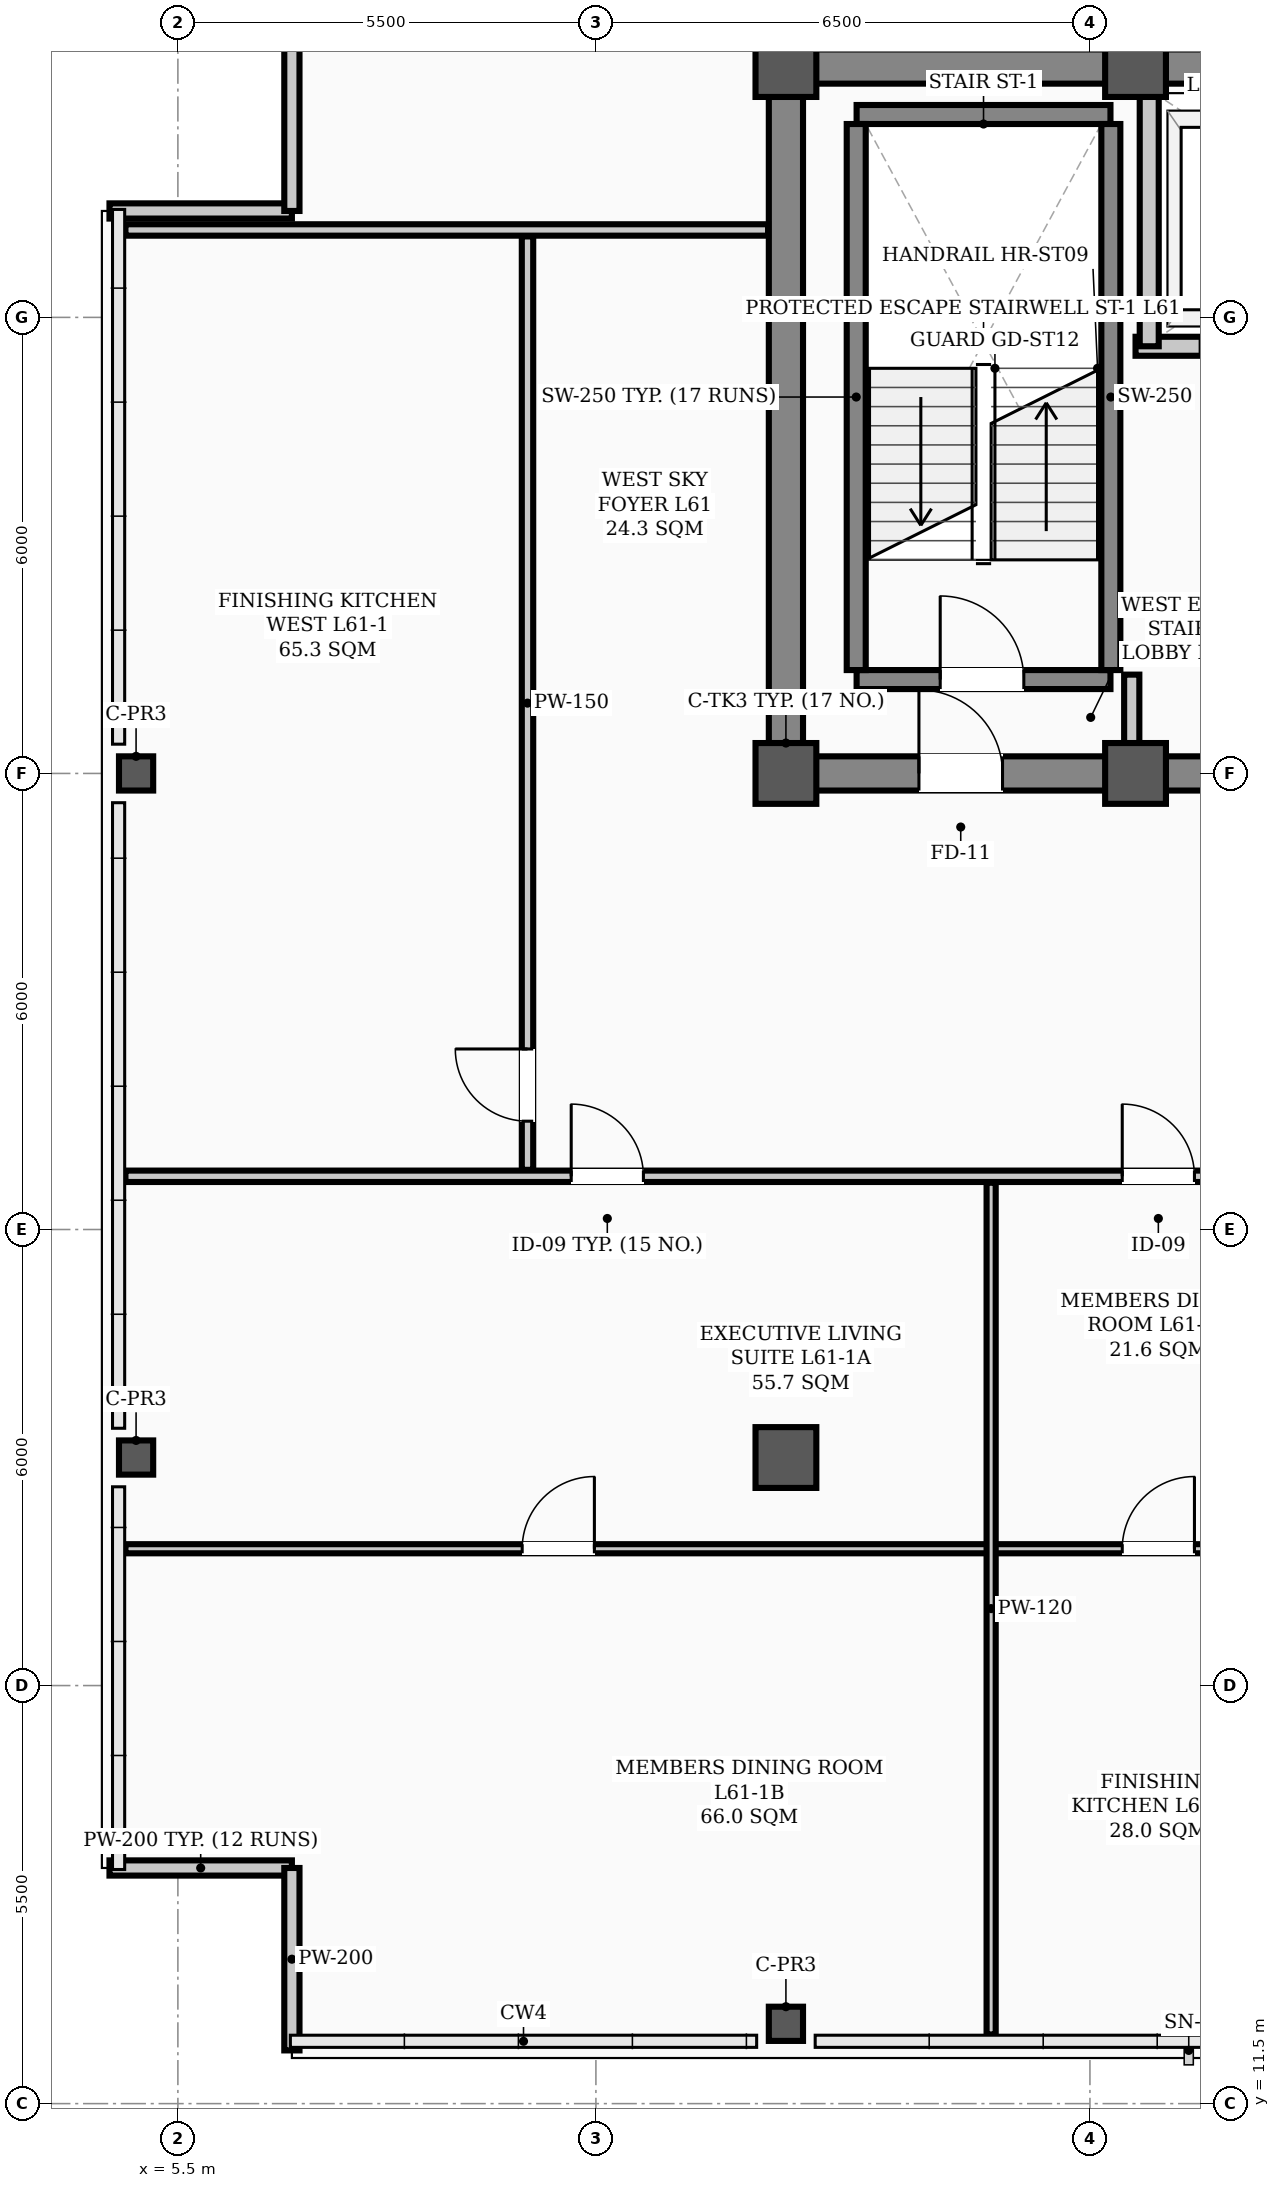
"""IFC4 building model, lengths in metres.
Left out: names, types, materials, properties, quantities, classifications, styles, units other than length and angle.
Written with IfcOpenShell. Run it as: python <this file> out.ifc"""

import sys

from ifc_helpers import new_model, si_unit, direction, frame, frame_2d, origin, origin_2d, place, context, subcontext, project, spatial, rectangle, hollow_rectangle, extrude, element, fill, save


model = new_model("IFC4")
c1 = context("Model", 3, precision=1e-05, world=origin(), true_north=direction((0.0, 1.0)))
c2 = subcontext(c1, "Body", "Model", "MODEL_VIEW")
j1 = project(units=[si_unit("LENGTHUNIT", "METRE"), si_unit("PLANEANGLEUNIT", "RADIAN")], contexts=[c1])
p1 = place(None, origin())
s1 = spatial("IfcSite", under=j1, at=p1, CompositionType="ELEMENT")
p2 = place(p1, origin())
s2 = spatial("IfcBuilding", under=s1, at=p2, CompositionType="ELEMENT")
p3 = place(p2, frame((0.0, 0.0, 246.2)))
s3 = spatial("IfcBuildingStorey", under=s2, at=p3, CompositionType="ELEMENT", Elevation=246.2)
for number, where, z_axis, x_axis in (
    (1, (13.5, 29.0, 0.0), (0.0, 0.0, 1.0), (1.0, 0.0, 0.0)),
    (2, (13.5, 38.3, 0.0), (0.0, 0.0, 1.0), (1.0, 0.0, 0.0)),
    (3, (18.1, 29.0, 0.0), (0.0, 0.0, 1.0), (1.0, 0.0, 0.0)),
    (4, (18.1, 38.3, 0.0), (0.0, 0.0, 1.0), (1.0, 0.0, 0.0)),
    (5, (13.5, 20.0, 0.0), (0.0, 0.0, 1.0), (1.0, 0.0, 0.0)),
):
    element("IfcColumn", number, at=place(p3, frame(where, z_axis=z_axis, x_axis=x_axis)), inside=s3, PredefinedType="COLUMN", context=c2, shape_type="SweptSolid", body=[
        extrude(hollow_rectangle(XDim=0.8, YDim=0.8, WallThickness=0.032, InnerFilletRadius=0.016, OuterFilletRadius=0.048, at=origin_2d()), origin(), (0.0, 0.0, 1.0), 3.9),
    ])
for number, where, z_axis, x_axis in (
    (6, (4.95, 20.0, 0.0), (0.0, 0.0, 1.0), (1.0, 0.0, 0.0)),
    (7, (4.95, 29.0, 0.0), (0.0, 0.0, 1.0), (1.0, 0.0, 0.0)),
    (8, (13.5, 12.55, 0.0), (0.0, 0.0, 1.0), (1.0, 0.0, 0.0)),
):
    element("IfcColumn", number, at=place(p3, frame(where, z_axis=z_axis, x_axis=x_axis)), inside=s3, PredefinedType="COLUMN", context=c2, shape_type="SweptSolid", body=[
        extrude(hollow_rectangle(XDim=0.45, YDim=0.45, WallThickness=0.022, InnerFilletRadius=0.022, OuterFilletRadius=0.044, at=origin_2d()), origin(), (0.0, 0.0, 1.0), 3.9),
    ])
p4 = place(p3, frame((4.6, 14.6, 0.0), z_axis=(0.0, 0.0, 1.0), x_axis=(1.0, 0.0, 0.0)))
e9 = element("IfcWall", 9, at=p4, inside=s3, PredefinedType="PARAPET", context=c2, shape_type="SweptSolid", body=[
    extrude(rectangle(XDim=2.4, YDim=0.2, at=frame_2d((1.2, 0.0))), origin(), (0.0, 0.0, 1.0), 1.2),
])
p5 = place(p3, frame((7.0, 14.6, 0.0), z_axis=(0.0, 0.0, 1.0), x_axis=(0.0, -1.0, 0.0)))
e10 = element("IfcWall", 10, at=p5, inside=s3, PredefinedType="PARAPET", context=c2, shape_type="SweptSolid", body=[
    extrude(rectangle(XDim=2.4, YDim=0.2, at=frame_2d((1.2, 0.0))), origin(), (0.0, 0.0, 1.0), 1.2),
])
p6 = place(p3, frame((4.6, 36.4, 0.0), z_axis=(0.0, 0.0, 1.0), x_axis=(1.0, 0.0, 0.0)))
e11 = element("IfcWall", 11, at=p6, inside=s3, PredefinedType="PARAPET", context=c2, shape_type="SweptSolid", body=[
    extrude(rectangle(XDim=2.4, YDim=0.2, at=frame_2d((1.2, 0.0))), origin(), (0.0, 0.0, 1.0), 1.2),
])
p7 = place(p3, frame((7.0, 36.4, 0.0), z_axis=(0.0, 0.0, 1.0), x_axis=(0.0, 1.0, 0.0)))
e12 = element("IfcWall", 12, at=p7, inside=s3, PredefinedType="PARAPET", context=c2, shape_type="SweptSolid", body=[
    extrude(rectangle(XDim=2.4, YDim=0.2, at=frame_2d((1.2, 0.0))), origin(), (0.0, 0.0, 1.0), 1.2),
])
p8 = place(p3, frame((13.5, 29.0, 0.0), z_axis=(0.0, 0.0, 1.0), x_axis=(1.0, 0.0, 0.0)))
e13 = element("IfcWall", 13, at=p8, inside=s3, PredefinedType="SHEAR", context=c2, shape_type="SweptSolid", body=[
    extrude(rectangle(XDim=30.5, YDim=0.45, at=frame_2d((15.25, 0.0))), origin(), (0.0, 0.0, 1.0), 3.72),
])
p9 = place(p8, frame((1.75, 0.0, 0.0)))
e14 = element("IfcOpeningElement", 14, at=p9, cuts=e13, PredefinedType="OPENING", context=c2, shape_type="SweptSolid", body=[
    extrude(rectangle(XDim=1.1, YDim=2.08, at=frame_2d((0.55, 1.04))), frame((0.0, 0.235, 0.0), z_axis=(0.0, -1.0, 0.0), x_axis=(1.0, 0.0, 0.0)), (0.0, 0.0, 1.0), 0.47),
])
p10 = place(p8, frame((26.7, 0.0, 0.0)))
e15 = element("IfcOpeningElement", 15, at=p10, cuts=e13, PredefinedType="OPENING", context=c2, shape_type="SweptSolid", body=[
    extrude(rectangle(XDim=1.1, YDim=2.08, at=frame_2d((0.55, 1.04))), frame((0.0, 0.235, 0.0), z_axis=(0.0, -1.0, 0.0), x_axis=(1.0, 0.0, 0.0)), (0.0, 0.0, 1.0), 0.47),
])
p11 = place(p8, frame((6.8, 0.0, 0.0)))
e16 = element("IfcOpeningElement", 16, at=p11, cuts=e13, PredefinedType="OPENING", context=c2, shape_type="SweptSolid", body=[
    extrude(rectangle(XDim=1.1, YDim=2.08, at=frame_2d((0.55, 1.04))), frame((0.0, 0.235, 0.0), z_axis=(0.0, -1.0, 0.0), x_axis=(1.0, 0.0, 0.0)), (0.0, 0.0, 1.0), 0.47),
])
p12 = place(p8, frame((13.2, 0.0, 0.0)))
e17 = element("IfcOpeningElement", 17, at=p12, cuts=e13, PredefinedType="OPENING", context=c2, shape_type="SweptSolid", body=[
    extrude(rectangle(XDim=1.6, YDim=2.08, at=frame_2d((0.8, 1.04))), frame((0.0, 0.235, 0.0), z_axis=(0.0, -1.0, 0.0), x_axis=(1.0, 0.0, 0.0)), (0.0, 0.0, 1.0), 0.47),
])
p13 = place(p8, frame((19.5, 0.0, 0.0)))
e18 = element("IfcOpeningElement", 18, at=p13, cuts=e13, PredefinedType="OPENING", context=c2, shape_type="SweptSolid", body=[
    extrude(rectangle(XDim=0.9, YDim=2.08, at=frame_2d((0.45, 1.04))), frame((0.0, 0.235, 0.0), z_axis=(0.0, -1.0, 0.0), x_axis=(1.0, 0.0, 0.0)), (0.0, 0.0, 1.0), 0.47),
])
p14 = place(p8, frame((21.55, 0.0, 0.0)))
e19 = element("IfcOpeningElement", 19, at=p14, cuts=e13, PredefinedType="OPENING", context=c2, shape_type="SweptSolid", body=[
    extrude(rectangle(XDim=0.9, YDim=2.08, at=frame_2d((0.45, 1.04))), frame((0.0, 0.235, 0.0), z_axis=(0.0, -1.0, 0.0), x_axis=(1.0, 0.0, 0.0)), (0.0, 0.0, 1.0), 0.47),
])
p15 = place(p3, frame((13.5, 38.3, 0.0), z_axis=(0.0, 0.0, 1.0), x_axis=(1.0, 0.0, 0.0)))
e20 = element("IfcWall", 20, at=p15, inside=s3, PredefinedType="SHEAR", context=c2, shape_type="SweptSolid", body=[
    extrude(rectangle(XDim=30.5, YDim=0.45, at=frame_2d((15.25, 0.0))), origin(), (0.0, 0.0, 1.0), 3.72),
])
p16 = place(p3, frame((13.5, 29.35, 0.0), z_axis=(0.0, 0.0, 1.0), x_axis=(0.0, 1.0, 0.0)))
e21 = element("IfcWall", 21, at=p16, inside=s3, PredefinedType="SHEAR", context=c2, shape_type="SweptSolid", body=[
    extrude(rectangle(XDim=8.6, YDim=0.45, at=frame_2d((4.3, 0.0))), origin(), (0.0, 0.0, 1.0), 3.72),
])
p17 = place(p3, frame((14.43, 30.235, 0.0), z_axis=(0.0, 0.0, 1.0), x_axis=(1.0, 0.0, 0.0)))
e22 = element("IfcWall", 22, at=p17, inside=s3, PredefinedType="STANDARD", context=c2, shape_type="SweptSolid", body=[
    extrude(rectangle(XDim=3.34, YDim=0.25, at=frame_2d((1.67, 0.0))), origin(), (0.0, 0.0, 1.0), 3.72),
])
p18 = place(p17, frame((1.1, 0.0, 0.0)))
e23 = element("IfcOpeningElement", 23, at=p18, cuts=e22, PredefinedType="OPENING", context=c2, shape_type="SweptSolid", body=[
    extrude(rectangle(XDim=1.1, YDim=2.08, at=frame_2d((0.55, 1.04))), frame((0.0, 0.135, 0.0), z_axis=(0.0, -1.0, 0.0), x_axis=(1.0, 0.0, 0.0)), (0.0, 0.0, 1.0), 0.27),
])
p19 = place(p3, frame((14.43, 37.669, 0.0), z_axis=(0.0, 0.0, 1.0), x_axis=(1.0, 0.0, 0.0)))
e24 = element("IfcWall", 24, at=p19, inside=s3, PredefinedType="STANDARD", context=c2, shape_type="SweptSolid", body=[
    extrude(rectangle(XDim=3.34, YDim=0.25, at=frame_2d((1.67, 0.0))), origin(), (0.0, 0.0, 1.0), 3.72),
])
for number, where, z_axis, x_axis in (
    (25, (14.425, 30.36, 0.0), (0.0, 0.0, 1.0), (0.0, 1.0, 0.0)),
    (26, (17.775, 30.36, 0.0), (0.0, 0.0, 1.0), (0.0, 1.0, 0.0)),
):
    element("IfcWall", number, at=place(p3, frame(where, z_axis=z_axis, x_axis=x_axis)), inside=s3, PredefinedType="STANDARD", context=c2, shape_type="SweptSolid", body=[
        extrude(rectangle(XDim=7.184, YDim=0.25, at=frame_2d((3.592, 0.0))), origin(), (0.0, 0.0, 1.0), 3.72),
    ])
p20 = place(p3, frame((18.1, 34.62, 0.0), z_axis=(0.0, 0.0, 1.0), x_axis=(1.0, 0.0, 0.0)))
e27 = element("IfcWall", 27, at=p20, inside=s3, PredefinedType="STANDARD", context=c2, shape_type="SweptSolid", body=[
    extrude(rectangle(XDim=5.35, YDim=0.25, at=frame_2d((2.675, 0.0))), origin(), (0.0, 0.0, 1.0), 3.72),
])
p21 = place(p20, frame((0.85, 0.0, 0.0)))
e28 = element("IfcOpeningElement", 28, at=p21, cuts=e27, PredefinedType="OPENING", context=c2, shape_type="SweptSolid", body=[
    extrude(rectangle(XDim=1.1, YDim=2.08, at=frame_2d((0.55, 1.04))), frame((0.0, 0.135, 0.0), z_axis=(0.0, -1.0, 0.0), x_axis=(1.0, 0.0, 0.0)), (0.0, 0.0, 1.0), 0.27),
])
p22 = place(p20, frame((3.45, 0.0, 0.0)))
e29 = element("IfcOpeningElement", 29, at=p22, cuts=e27, PredefinedType="OPENING", context=c2, shape_type="SweptSolid", body=[
    extrude(rectangle(XDim=1.1, YDim=2.08, at=frame_2d((0.55, 1.04))), frame((0.0, 0.135, 0.0), z_axis=(0.0, -1.0, 0.0), x_axis=(1.0, 0.0, 0.0)), (0.0, 0.0, 1.0), 0.27),
])
p23 = place(p3, frame((18.28, 34.62, 0.0), z_axis=(0.0, 0.0, 1.0), x_axis=(0.0, 1.0, 0.0)))
e30 = element("IfcWall", 30, at=p23, inside=s3, PredefinedType="STANDARD", context=c2, shape_type="SweptSolid", body=[
    extrude(rectangle(XDim=3.33, YDim=0.25, at=frame_2d((1.665, 0.0))), origin(), (0.0, 0.0, 1.0), 3.72),
])
p24 = place(p3, frame((4.81, 23.7, 0.0), z_axis=(0.0, 0.0, 1.0), x_axis=(1.0, 0.0, 0.0)))
e31 = element("IfcWall", 31, at=p24, inside=s3, PredefinedType="PARTITIONING", context=c2, shape_type="SweptSolid", body=[
    extrude(rectangle(XDim=40.88, YDim=0.15, at=frame_2d((20.44, 0.0))), origin(), (0.0, 0.0, 1.0), 3.2),
])
p25 = place(p24, frame((5.865, 0.0, 0.0)))
e32 = element("IfcOpeningElement", 32, at=p25, cuts=e31, PredefinedType="OPENING", context=c2, shape_type="SweptSolid", body=[
    extrude(rectangle(XDim=0.95, YDim=2.08, at=frame_2d((0.475, 1.04))), frame((0.0, 0.085, 0.0), z_axis=(0.0, -1.0, 0.0), x_axis=(1.0, 0.0, 0.0)), (0.0, 0.0, 1.0), 0.17),
])
p26 = place(p24, frame((13.115, 0.0, 0.0)))
e33 = element("IfcOpeningElement", 33, at=p26, cuts=e31, PredefinedType="OPENING", context=c2, shape_type="SweptSolid", body=[
    extrude(rectangle(XDim=0.95, YDim=2.08, at=frame_2d((0.475, 1.04))), frame((0.0, 0.085, 0.0), z_axis=(0.0, -1.0, 0.0), x_axis=(1.0, 0.0, 0.0)), (0.0, 0.0, 1.0), 0.17),
])
p27 = place(p24, frame((16.515, 0.0, 0.0)))
e34 = element("IfcOpeningElement", 34, at=p27, cuts=e31, PredefinedType="OPENING", context=c2, shape_type="SweptSolid", body=[
    extrude(rectangle(XDim=0.95, YDim=2.08, at=frame_2d((0.475, 1.04))), frame((0.0, 0.085, 0.0), z_axis=(0.0, -1.0, 0.0), x_axis=(1.0, 0.0, 0.0)), (0.0, 0.0, 1.0), 0.17),
])
p28 = place(p24, frame((22.915, 0.0, 0.0)))
e35 = element("IfcOpeningElement", 35, at=p28, cuts=e31, PredefinedType="OPENING", context=c2, shape_type="SweptSolid", body=[
    extrude(rectangle(XDim=0.95, YDim=2.08, at=frame_2d((0.475, 1.04))), frame((0.0, 0.085, 0.0), z_axis=(0.0, -1.0, 0.0), x_axis=(1.0, 0.0, 0.0)), (0.0, 0.0, 1.0), 0.17),
])
p29 = place(p24, frame((29.115, 0.0, 0.0)))
e36 = element("IfcOpeningElement", 36, at=p29, cuts=e31, PredefinedType="OPENING", context=c2, shape_type="SweptSolid", body=[
    extrude(rectangle(XDim=0.95, YDim=2.08, at=frame_2d((0.475, 1.04))), frame((0.0, 0.085, 0.0), z_axis=(0.0, -1.0, 0.0), x_axis=(1.0, 0.0, 0.0)), (0.0, 0.0, 1.0), 0.17),
])
p30 = place(p24, frame((34.215, 0.0, 0.0)))
e37 = element("IfcOpeningElement", 37, at=p30, cuts=e31, PredefinedType="OPENING", context=c2, shape_type="SweptSolid", body=[
    extrude(rectangle(XDim=0.95, YDim=2.08, at=frame_2d((0.475, 1.04))), frame((0.0, 0.085, 0.0), z_axis=(0.0, -1.0, 0.0), x_axis=(1.0, 0.0, 0.0)), (0.0, 0.0, 1.0), 0.17),
])
p31 = place(p24, frame((38.46, 0.0, 0.0)))
e38 = element("IfcOpeningElement", 38, at=p31, cuts=e31, PredefinedType="OPENING", context=c2, shape_type="SweptSolid", body=[
    extrude(rectangle(XDim=0.95, YDim=2.08, at=frame_2d((0.475, 1.04))), frame((0.0, 0.085, 0.0), z_axis=(0.0, -1.0, 0.0), x_axis=(1.0, 0.0, 0.0)), (0.0, 0.0, 1.0), 0.17),
])
p32 = place(p3, frame((4.81, 36.15, 0.0), z_axis=(0.0, 0.0, 1.0), x_axis=(1.0, 0.0, 0.0)))
e39 = element("IfcWall", 39, at=p32, inside=s3, PredefinedType="PARTITIONING", context=c2, shape_type="SweptSolid", body=[
    extrude(rectangle(XDim=8.455, YDim=0.15, at=frame_2d((4.228, 0.0))), origin(), (0.0, 0.0, 1.0), 3.2),
])
p33 = place(p3, frame((4.81, 18.8, 0.0), z_axis=(0.0, 0.0, 1.0), x_axis=(1.0, 0.0, 0.0)))
e40 = element("IfcWall", 40, at=p33, inside=s3, PredefinedType="PARTITIONING", context=c2, shape_type="SweptSolid", body=[
    extrude(rectangle(XDim=11.39, YDim=0.12, at=frame_2d((5.695, 0.0))), origin(), (0.0, 0.0, 1.0), 3.2),
])
p34 = place(p33, frame((5.22, 0.0, 0.0)))
e41 = element("IfcOpeningElement", 41, at=p34, cuts=e40, PredefinedType="OPENING", context=c2, shape_type="SweptSolid", body=[
    extrude(rectangle(XDim=0.95, YDim=2.08, at=frame_2d((0.475, 1.04))), frame((0.0, 0.07, 0.0), z_axis=(0.0, -1.0, 0.0), x_axis=(1.0, 0.0, 0.0)), (0.0, 0.0, 1.0), 0.14),
])
p35 = place(p3, frame((16.2, 18.8, 0.0), z_axis=(0.0, 0.0, 1.0), x_axis=(1.0, 0.0, 0.0)))
e42 = element("IfcWall", 42, at=p35, inside=s3, PredefinedType="PARTITIONING", context=c2, shape_type="SweptSolid", body=[
    extrude(rectangle(XDim=4.4, YDim=0.12, at=frame_2d((2.2, 0.0))), origin(), (0.0, 0.0, 1.0), 3.35),
])
p36 = place(p35, frame((1.725, 0.0, 0.0)))
e43 = element("IfcOpeningElement", 43, at=p36, cuts=e42, PredefinedType="OPENING", context=c2, shape_type="SweptSolid", body=[
    extrude(rectangle(XDim=0.95, YDim=2.08, at=frame_2d((0.475, 1.04))), frame((0.0, 0.07, 0.0), z_axis=(0.0, -1.0, 0.0), x_axis=(1.0, 0.0, 0.0)), (0.0, 0.0, 1.0), 0.14),
])
p37 = place(p3, frame((18.05, 29.235, 0.0), z_axis=(0.0, 0.0, 1.0), x_axis=(0.0, 1.0, 0.0)))
e44 = element("IfcWall", 44, at=p37, inside=s3, PredefinedType="STANDARD", context=c2, shape_type="SweptSolid", body=[
    extrude(rectangle(XDim=1.065, YDim=0.2, at=frame_2d((0.532, 0.0))), origin(), (0.0, 0.0, 1.0), 3.35),
])
p38 = place(p3, frame((10.1, 23.785, 0.0), z_axis=(0.0, 0.0, 1.0), x_axis=(0.0, 1.0, 0.0)))
e45 = element("IfcWall", 45, at=p38, inside=s3, PredefinedType="PARTITIONING", context=c2, shape_type="SweptSolid", body=[
    extrude(rectangle(XDim=12.28, YDim=0.15, at=frame_2d((6.14, 0.0))), origin(), (0.0, 0.0, 1.0), 3.1),
])
p39 = place(p38, frame((0.64, 0.0, 0.0)))
e46 = element("IfcOpeningElement", 46, at=p39, cuts=e45, PredefinedType="OPENING", context=c2, shape_type="SweptSolid", body=[
    extrude(rectangle(XDim=0.95, YDim=2.08, at=frame_2d((0.475, 1.04))), frame((0.0, 0.085, 0.0), z_axis=(0.0, -1.0, 0.0), x_axis=(1.0, 0.0, 0.0)), (0.0, 0.0, 1.0), 0.17),
])
p40 = place(p3, frame((16.2, 12.41, 0.0), z_axis=(0.0, 0.0, 1.0), x_axis=(0.0, 1.0, 0.0)))
e47 = element("IfcWall", 47, at=p40, inside=s3, PredefinedType="PARTITIONING", context=c2, shape_type="SweptSolid", body=[
    extrude(rectangle(XDim=11.205, YDim=0.12, at=frame_2d((5.603, 0.0))), origin(), (0.0, 0.0, 1.0), 3.1),
])
p41 = place(p18, origin())
e48 = element("IfcDoor", 48, at=p41, inside=s3, OperationType="SINGLE_SWING_LEFT", PredefinedType="DOOR", context=c2, shape_type="SweptSolid", body=[
    extrude(rectangle(XDim=1.1, YDim=2.08, at=frame_2d((0.55, 1.04))), frame((0.0, 0.025, 0.0), z_axis=(0.0, -1.0, 0.0), x_axis=(1.0, 0.0, 0.0)), (0.0, 0.0, 1.0), 0.05),
])
fill(e23, e48)
p42 = place(p9, origin())
e49 = element("IfcDoor", 49, at=p42, inside=s3, OperationType="SINGLE_SWING_LEFT", PredefinedType="DOOR", context=c2, shape_type="SweptSolid", body=[
    extrude(rectangle(XDim=1.1, YDim=2.08, at=frame_2d((0.55, 1.04))), frame((0.0, 0.025, 0.0), z_axis=(0.0, -1.0, 0.0), x_axis=(1.0, 0.0, 0.0)), (0.0, 0.0, 1.0), 0.05),
])
fill(e14, e49)
p43 = place(p34, origin())
e50 = element("IfcDoor", 50, at=p43, inside=s3, OperationType="SINGLE_SWING_RIGHT", PredefinedType="DOOR", context=c2, shape_type="SweptSolid", body=[
    extrude(rectangle(XDim=0.95, YDim=2.08, at=frame_2d((0.475, 1.04))), frame((0.0, 0.025, 0.0), z_axis=(0.0, -1.0, 0.0), x_axis=(1.0, 0.0, 0.0)), (0.0, 0.0, 1.0), 0.05),
])
fill(e41, e50)
p44 = place(p25, origin())
e51 = element("IfcDoor", 51, at=p44, inside=s3, OperationType="SINGLE_SWING_LEFT", PredefinedType="DOOR", context=c2, shape_type="SweptSolid", body=[
    extrude(rectangle(XDim=0.95, YDim=2.08, at=frame_2d((0.475, 1.04))), frame((0.0, 0.025, 0.0), z_axis=(0.0, -1.0, 0.0), x_axis=(1.0, 0.0, 0.0)), (0.0, 0.0, 1.0), 0.05),
])
fill(e32, e51)
p45 = place(p36, origin())
e52 = element("IfcDoor", 52, at=p45, inside=s3, OperationType="SINGLE_SWING_RIGHT", PredefinedType="DOOR", context=c2, shape_type="SweptSolid", body=[
    extrude(rectangle(XDim=0.95, YDim=2.08, at=frame_2d((0.475, 1.04))), frame((0.0, 0.025, 0.0), z_axis=(0.0, -1.0, 0.0), x_axis=(1.0, 0.0, 0.0)), (0.0, 0.0, 1.0), 0.05),
])
fill(e43, e52)
p46 = place(p26, origin())
e53 = element("IfcDoor", 53, at=p46, inside=s3, OperationType="SINGLE_SWING_LEFT", PredefinedType="DOOR", context=c2, shape_type="SweptSolid", body=[
    extrude(rectangle(XDim=0.95, YDim=2.08, at=frame_2d((0.475, 1.04))), frame((0.0, 0.025, 0.0), z_axis=(0.0, -1.0, 0.0), x_axis=(1.0, 0.0, 0.0)), (0.0, 0.0, 1.0), 0.05),
])
fill(e33, e53)
p47 = place(p39, origin())
e54 = element("IfcDoor", 54, at=p47, inside=s3, OperationType="SINGLE_SWING_RIGHT", PredefinedType="DOOR", context=c2, shape_type="SweptSolid", body=[
    extrude(rectangle(XDim=0.95, YDim=2.08, at=frame_2d((0.475, 1.04))), frame((0.0, 0.025, 0.0), z_axis=(0.0, -1.0, 0.0), x_axis=(1.0, 0.0, 0.0)), (0.0, 0.0, 1.0), 0.05),
])
fill(e46, e54)
save(model, sys.argv[1])
